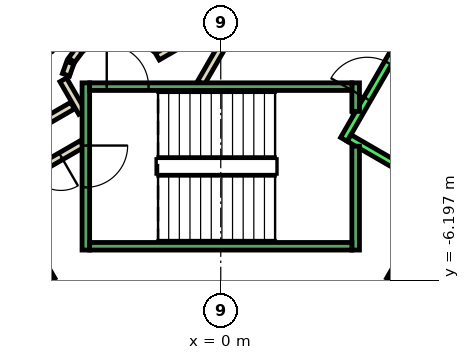
"""IFC4 building model, lengths in metres.
Left out: names, types, materials, properties, quantities, classifications, styles, units other than length and angle.
Written with IfcOpenShell. Run it as: python <this file> out.ifc"""

import sys

from ifc_helpers import new_model, si_unit, direction, frame, frame_2d, origin, place, context, subcontext, project, spatial, rectangle, extrude, element, fill, save


model = new_model("IFC4")
c1 = context("Model", 3, precision=1e-05, world=origin(), true_north=direction((0.0, 1.0)))
c2 = subcontext(c1, "Body", "Model", "MODEL_VIEW")
j1 = project(units=[si_unit("LENGTHUNIT", "METRE"), si_unit("PLANEANGLEUNIT", "RADIAN")], contexts=[c1])
p1 = place(None, origin())
s1 = spatial("IfcSite", under=j1, at=p1, CompositionType="ELEMENT")
p2 = place(p1, origin())
s2 = spatial("IfcBuilding", under=s1, at=p2, CompositionType="ELEMENT")
p3 = place(p2, frame((0.0, 0.0, 35.0)))
s3 = spatial("IfcBuildingStorey", under=s2, at=p3, CompositionType="ELEMENT", Elevation=35.0)
p4 = place(p3, frame((-3.9, -1.599, 0.0), z_axis=(0.0, 0.0, 1.0), x_axis=(-0.865969445389, -0.500096910261, 0.0)))
e1 = element("IfcWall", 1, at=p4, inside=s3, PredefinedType="PARTITIONING", context=c2, shape_type="SweptSolid", body=[
    extrude(rectangle(XDim=1.373, YDim=0.2, at=frame_2d((0.687, 0.0))), origin(), (0.0, 0.0, 1.0), 3.8),
])
p5 = place(p3, frame((-3.65, -2.61, 0.0), z_axis=(0.0, 0.0, 1.0), x_axis=(-0.866072462134, -0.499918483688, 0.0)))
e2 = element("IfcWall", 2, at=p5, inside=s3, PredefinedType="PARTITIONING", context=c2, shape_type="SweptSolid", body=[
    extrude(rectangle(XDim=2.084, YDim=0.2, at=frame_2d((1.042, 0.0))), origin(), (0.0, 0.0, 1.0), 3.8),
])
p6 = place(p5, frame((0.642, 0.0, 0.0)))
e3 = element("IfcOpeningElement", 3, at=p6, cuts=e2, PredefinedType="OPENING", context=c2, shape_type="SweptSolid", body=[
    extrude(rectangle(XDim=0.9, YDim=2.1, at=frame_2d((0.45, 1.05))), frame((0.0, 0.11, 0.0), z_axis=(0.0, -1.0, 0.0), x_axis=(1.0, 0.0, 0.0)), (0.0, 0.0, 1.0), 0.22),
])
p7 = place(p3, frame((-4.145, -0.92, 0.0), z_axis=(0.0, 0.0, 1.0), x_axis=(0.499743786207, -0.866173278362, 0.0)))
e4 = element("IfcWall", 4, at=p7, inside=s3, PredefinedType="PARTITIONING", context=c2, shape_type="SweptSolid", body=[
    extrude(rectangle(XDim=0.991, YDim=0.2, at=frame_2d((0.495, 0.0))), origin(), (0.0, 0.0, 1.0), 3.8),
])
p8 = place(p3, frame((-0.52, -1.0, 0.0), z_axis=(0.0, 0.0, 1.0), x_axis=(0.50011622646, 0.865958290007, 0.0)))
e5 = element("IfcWall", 5, at=p8, inside=s3, PredefinedType="PARTITIONING", context=c2, shape_type="SweptSolid", body=[
    extrude(rectangle(XDim=4.991, YDim=0.2, at=frame_2d((2.496, 0.0))), origin(), (0.0, 0.0, 1.0), 3.8),
])
p9 = place(p8, frame((1.945, 0.0, 0.0)))
e6 = element("IfcOpeningElement", 6, at=p9, cuts=e5, PredefinedType="OPENING", context=c2, shape_type="SweptSolid", body=[
    extrude(rectangle(XDim=1.0, YDim=2.1, at=frame_2d((0.5, 1.05))), frame((0.0, 0.11, 0.0), z_axis=(0.0, -1.0, 0.0), x_axis=(1.0, 0.0, 0.0)), (0.0, 0.0, 1.0), 0.22),
])
p10 = place(p3, frame((-0.412, 0.414, 0.0), z_axis=(0.0, 0.0, 1.0), x_axis=(-0.866017369001, -0.500013916395, 0.0)))
e7 = element("IfcWall", 7, at=p10, inside=s3, PredefinedType="PARTITIONING", context=c2, shape_type="SweptSolid", body=[
    extrude(rectangle(XDim=1.45, YDim=0.2, at=frame_2d((0.725, 0.0))), origin(), (0.0, 0.0, 1.0), 3.8),
])
p11 = place(p3, frame((-3.723, -0.131, 0.0), z_axis=(0.0, 0.0, 1.0), x_axis=(-0.594675113454, -0.803966112121, 0.0)))
e8 = element("IfcWall", 8, at=p11, inside=s3, PredefinedType="PARTITIONING", context=c2, shape_type="SweptSolid", body=[
    extrude(rectangle(XDim=0.338, YDim=0.2, at=frame_2d((0.169, 0.0))), origin(), (0.0, 0.0, 1.0), 3.8),
])
p12 = place(p3, frame((-3.96, -0.47, 0.0), z_axis=(0.0, 0.0, 1.0), x_axis=(-0.334824194261, -0.942280615813, 0.0)))
e9 = element("IfcWall", 9, at=p12, inside=s3, PredefinedType="PARTITIONING", context=c2, shape_type="SweptSolid", body=[
    extrude(rectangle(XDim=0.338, YDim=0.2, at=frame_2d((0.169, 0.0))), origin(), (0.0, 0.0, 1.0), 3.8),
])
p13 = place(p3, frame((-9.751, 2.99, 0.0), z_axis=(0.0, 0.0, 1.0), x_axis=(0.50000090737, -0.866024879913, 0.0)))
e10 = element("IfcWall", 10, at=p13, inside=s3, PredefinedType="STANDARD", context=c2, shape_type="SweptSolid", body=[
    extrude(rectangle(XDim=10.6, YDim=0.2, at=frame_2d((5.3, 0.0))), origin(), (0.0, 0.0, 1.0), 3.8),
])
p14 = place(p3, frame((3.24, -2.488, 0.0), z_axis=(0.0, 0.0, 1.0), x_axis=(0.49994636267, 0.866056369097, 0.0)))
e11 = element("IfcWall", 11, at=p14, inside=s3, PredefinedType="STANDARD", context=c2, shape_type="SweptSolid", body=[
    extrude(rectangle(XDim=2.8, YDim=0.2, at=frame_2d((1.4, 0.0))), origin(), (0.0, 0.0, 1.0), 3.8),
])
p15 = place(p14, frame((1.225, 0.0, 0.0)))
e12 = element("IfcOpeningElement", 12, at=p15, cuts=e11, PredefinedType="OPENING", context=c2, shape_type="SweptSolid", body=[
    extrude(rectangle(XDim=1.1, YDim=2.1, at=frame_2d((0.55, 1.05))), frame((0.0, 0.11, 0.0), z_axis=(0.0, -1.0, 0.0), x_axis=(1.0, 0.0, 0.0)), (0.0, 0.0, 1.0), 0.22),
])
p16 = place(p3, frame((3.377, -2.452, 0.0), z_axis=(0.0, 0.0, 1.0), x_axis=(0.865955154139, -0.50012165622, 0.0)))
e13 = element("IfcWall", 13, at=p16, inside=s3, PredefinedType="STANDARD", context=c2, shape_type="SweptSolid", body=[
    extrude(rectangle(XDim=2.4, YDim=0.2, at=frame_2d((1.2, 0.0))), origin(), (0.0, 0.0, 1.0), 3.8),
])
p17 = place(p3, frame((4.451, -6.19, 0.0), z_axis=(0.0, 0.0, 1.0), x_axis=(0.50000090737, 0.866024879913, 0.0)))
e14 = element("IfcWall", 14, at=p17, inside=s3, PredefinedType="STANDARD", context=c2, shape_type="SweptSolid", body=[
    extrude(rectangle(XDim=10.6, YDim=0.2, at=frame_2d((5.3, 0.0))), origin(), (0.0, 0.0, 1.0), 3.8),
])
p18 = place(p3, frame((-3.55, -1.0, 0.0), z_axis=(0.0, 0.0, 1.0), x_axis=(0.0, -1.0, 0.0)))
e15 = element("IfcWall", 15, at=p18, inside=s3, PredefinedType="STANDARD", context=c2, shape_type="SweptSolid", body=[
    extrude(rectangle(XDim=4.4, YDim=0.2, at=frame_2d((2.2, 0.0))), origin(), (0.0, 0.0, 1.0), 3.8),
])
p19 = place(p18, frame((1.65, 0.0, 0.0)))
e16 = element("IfcOpeningElement", 16, at=p19, cuts=e15, PredefinedType="OPENING", context=c2, shape_type="SweptSolid", body=[
    extrude(rectangle(XDim=1.1, YDim=2.2, at=frame_2d((0.55, 1.1))), frame((0.0, 0.11, 0.0), z_axis=(0.0, -1.0, 0.0), x_axis=(1.0, 0.0, 0.0)), (0.0, 0.0, 1.0), 0.22),
])
p20 = place(p3, frame((3.55, -2.667, 0.0), z_axis=(0.0, 0.0, 1.0), x_axis=(0.0, -1.0, 0.0)))
e17 = element("IfcWall", 17, at=p20, inside=s3, PredefinedType="STANDARD", context=c2, shape_type="SweptSolid", body=[
    extrude(rectangle(XDim=2.733, YDim=0.2, at=frame_2d((1.366, 0.0))), origin(), (0.0, 0.0, 1.0), 3.8),
])
p21 = place(p3, frame((3.55, -1.0, 0.0), z_axis=(0.0, 0.0, 1.0), x_axis=(0.0, -1.0, 0.0)))
e18 = element("IfcWall", 18, at=p21, inside=s3, PredefinedType="STANDARD", context=c2, shape_type="SweptSolid", body=[
    extrude(rectangle(XDim=0.751, YDim=0.2, at=frame_2d((0.375, 0.0))), origin(), (0.0, 0.0, 1.0), 3.8),
])
p22 = place(p3, frame((-3.45, -1.1, 0.0), z_axis=(0.0, 0.0, 1.0), x_axis=(1.0, 0.0, 0.0)))
e19 = element("IfcWall", 19, at=p22, inside=s3, PredefinedType="STANDARD", context=c2, shape_type="SweptSolid", body=[
    extrude(rectangle(XDim=6.9, YDim=0.2, at=frame_2d((3.45, 0.0))), origin(), (0.0, 0.0, 1.0), 3.8),
])
p23 = place(p22, frame((0.45, 0.0, 0.0)))
e20 = element("IfcOpeningElement", 20, at=p23, cuts=e19, PredefinedType="OPENING", context=c2, shape_type="SweptSolid", body=[
    extrude(rectangle(XDim=1.1, YDim=2.2, at=frame_2d((0.55, 1.1))), frame((0.0, 0.11, 0.0), z_axis=(0.0, -1.0, 0.0), x_axis=(1.0, 0.0, 0.0)), (0.0, 0.0, 1.0), 0.22),
])
p24 = place(p3, frame((-3.45, -5.3, 0.0), z_axis=(0.0, 0.0, 1.0), x_axis=(1.0, 0.0, 0.0)))
e21 = element("IfcWall", 21, at=p24, inside=s3, PredefinedType="STANDARD", context=c2, shape_type="SweptSolid", body=[
    extrude(rectangle(XDim=6.9, YDim=0.2, at=frame_2d((3.45, 0.0))), origin(), (0.0, 0.0, 1.0), 3.8),
])
p25 = place(p6, origin())
e22 = element("IfcDoor", 22, at=p25, inside=s3, OperationType="SINGLE_SWING_LEFT", PredefinedType="DOOR", context=c2, shape_type="SweptSolid", body=[
    extrude(rectangle(XDim=0.9, YDim=2.1, at=frame_2d((0.45, 1.05))), frame((0.0, 0.025, 0.0), z_axis=(0.0, -1.0, 0.0), x_axis=(1.0, 0.0, 0.0)), (0.0, 0.0, 1.0), 0.05),
])
fill(e3, e22)
p26 = place(p15, origin())
e23 = element("IfcDoor", 23, at=p26, inside=s3, OperationType="SLIDING_TO_LEFT", PredefinedType="DOOR", context=c2, shape_type="SweptSolid", body=[
    extrude(rectangle(XDim=1.1, YDim=2.1, at=frame_2d((0.55, 1.05))), frame((0.0, 0.025, 0.0), z_axis=(0.0, -1.0, 0.0), x_axis=(1.0, 0.0, 0.0)), (0.0, 0.0, 1.0), 0.05),
])
fill(e12, e23)
p27 = place(p23, origin())
e24 = element("IfcDoor", 24, at=p27, inside=s3, OperationType="SINGLE_SWING_LEFT", PredefinedType="DOOR", context=c2, shape_type="SweptSolid", body=[
    extrude(rectangle(XDim=1.1, YDim=2.2, at=frame_2d((0.55, 1.1))), frame((0.0, 0.025, 0.0), z_axis=(0.0, -1.0, 0.0), x_axis=(1.0, 0.0, 0.0)), (0.0, 0.0, 1.0), 0.05),
])
fill(e20, e24)
p28 = place(p19, origin())
e25 = element("IfcDoor", 25, at=p28, inside=s3, OperationType="SINGLE_SWING_LEFT", PredefinedType="DOOR", context=c2, shape_type="SweptSolid", body=[
    extrude(rectangle(XDim=1.1, YDim=2.2, at=frame_2d((0.55, 1.1))), frame((0.0, 0.025, 0.0), z_axis=(0.0, -1.0, 0.0), x_axis=(1.0, 0.0, 0.0)), (0.0, 0.0, 1.0), 0.05),
])
fill(e16, e25)
save(model, sys.argv[1])
